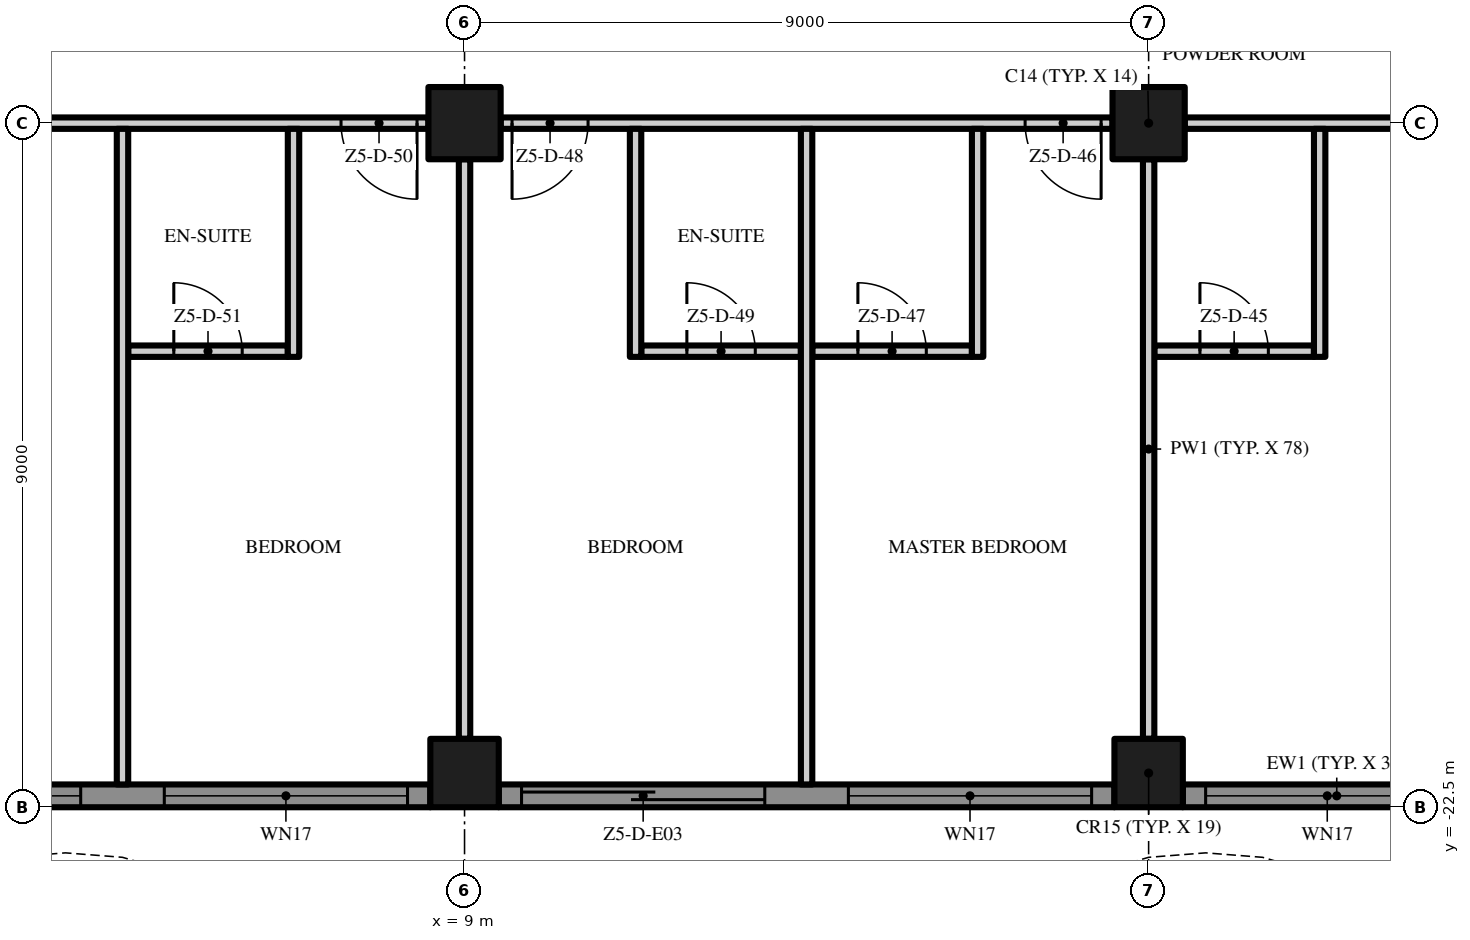
"""IFC4 building model, lengths in metres.
Left out: names, types, materials, properties, quantities, classifications, styles, units other than length and angle.
Written with IfcOpenShell. Run it as: python <this file> out.ifc"""

import sys

from ifc_helpers import new_model, si_unit, direction, frame, frame_2d, origin, origin_2d, place, context, subcontext, project, spatial, polyline, rectangle, outline, extrude, element, fill, save


model = new_model("IFC4")
c1 = context("Model", 3, precision=1e-05, world=origin(), true_north=direction((0.0, 1.0)))
c2 = subcontext(c1, "Body", "Model", "MODEL_VIEW")
j1 = project(units=[si_unit("LENGTHUNIT", "METRE"), si_unit("PLANEANGLEUNIT", "RADIAN")], contexts=[c1])
p1 = place(None, origin())
s1 = spatial("IfcSite", under=j1, at=p1, CompositionType="ELEMENT")
p2 = place(p1, origin())
s2 = spatial("IfcBuilding", under=s1, at=p2, CompositionType="ELEMENT")
p3 = place(p2, frame((0.0, 0.0, 273.0)))
s3 = spatial("IfcBuildingStorey", under=s2, at=p3, CompositionType="ELEMENT", Elevation=273.0)
p4 = place(p3, frame((18.0, -13.5, 0.0), z_axis=(0.0, 0.0, 1.0), x_axis=(1.0, 0.0, 0.0)))
e1 = element("IfcColumn", 1, at=p4, inside=s3, PredefinedType="COLUMN", context=c2, shape_type="SweptSolid", body=[
    extrude(rectangle(XDim=0.95, YDim=0.95, at=origin_2d()), origin(), (0.0, 0.0, 1.0), 3.5),
])
p5 = place(p3, frame((18.0, -22.05, 0.0), z_axis=(0.0, 0.0, 1.0), x_axis=(1.0, 0.0, 0.0)))
e2 = element("IfcColumn", 2, at=p5, inside=s3, PredefinedType="COLUMN", context=c2, shape_type="SweptSolid", body=[
    extrude(rectangle(XDim=0.9, YDim=0.9, at=origin_2d()), origin(), (0.0, 0.0, 1.0), 3.5),
])
p6 = place(p3, frame((9.0, -13.5, 0.0), z_axis=(0.0, 0.0, 1.0), x_axis=(1.0, 0.0, 0.0)))
e3 = element("IfcColumn", 3, at=p6, inside=s3, PredefinedType="COLUMN", context=c2, shape_type="SweptSolid", body=[
    extrude(rectangle(XDim=0.95, YDim=0.95, at=origin_2d()), origin(), (0.0, 0.0, 1.0), 3.5),
])
p7 = place(p3, frame((9.0, -22.05, 0.0), z_axis=(0.0, 0.0, 1.0), x_axis=(1.0, 0.0, 0.0)))
e4 = element("IfcColumn", 4, at=p7, inside=s3, PredefinedType="COLUMN", context=c2, shape_type="SweptSolid", body=[
    extrude(rectangle(XDim=0.9, YDim=0.9, at=origin_2d()), origin(), (0.0, 0.0, 1.0), 3.5),
])
p8 = place(p3, frame((8.55, -22.35, 0.0), z_axis=(0.0, 0.0, 1.0), x_axis=(-1.0, 0.0, 0.0)))
e5 = element("IfcWall", 5, at=p8, inside=s3, PredefinedType="SOLIDWALL", context=c2, shape_type="SweptSolid", body=[
    extrude(rectangle(XDim=8.1, YDim=0.3, at=frame_2d((4.05, 0.0))), origin(), (0.0, 0.0, 1.0), 3.5),
])
p9 = place(p8, frame((4.6, 0.0, 0.45)))
e6 = element("IfcOpeningElement", 6, at=p9, cuts=e5, PredefinedType="OPENING", context=c2, shape_type="SweptSolid", body=[
    extrude(rectangle(XDim=3.2, YDim=2.65, at=frame_2d((1.6, 1.325))), frame((0.0, 0.16, 0.0), z_axis=(0.0, -1.0, 0.0), x_axis=(1.0, 0.0, 0.0)), (0.0, 0.0, 1.0), 0.32),
])
p10 = place(p8, frame((0.3, 0.0, 0.45)))
e7 = element("IfcOpeningElement", 7, at=p10, cuts=e5, PredefinedType="OPENING", context=c2, shape_type="SweptSolid", body=[
    extrude(rectangle(XDim=3.2, YDim=2.65, at=frame_2d((1.6, 1.325))), frame((0.0, 0.16, 0.0), z_axis=(0.0, -1.0, 0.0), x_axis=(1.0, 0.0, 0.0)), (0.0, 0.0, 1.0), 0.32),
])
p11 = place(p3, frame((17.55, -22.35, 0.0), z_axis=(0.0, 0.0, 1.0), x_axis=(-1.0, 0.0, 0.0)))
e8 = element("IfcWall", 8, at=p11, inside=s3, PredefinedType="SOLIDWALL", context=c2, shape_type="SweptSolid", body=[
    extrude(rectangle(XDim=8.1, YDim=0.3, at=frame_2d((4.05, 0.0))), origin(), (0.0, 0.0, 1.0), 3.5),
])
p12 = place(p11, frame((4.6, 0.0, 0.0)))
e9 = element("IfcOpeningElement", 9, at=p12, cuts=e8, PredefinedType="OPENING", context=c2, shape_type="SweptSolid", body=[
    extrude(rectangle(XDim=3.2, YDim=2.4, at=frame_2d((1.6, 1.2))), frame((0.0, 0.16, 0.0), z_axis=(0.0, -1.0, 0.0), x_axis=(1.0, 0.0, 0.0)), (0.0, 0.0, 1.0), 0.32),
])
p13 = place(p11, frame((0.3, 0.0, 0.45)))
e10 = element("IfcOpeningElement", 10, at=p13, cuts=e8, PredefinedType="OPENING", context=c2, shape_type="SweptSolid", body=[
    extrude(rectangle(XDim=3.2, YDim=2.65, at=frame_2d((1.6, 1.325))), frame((0.0, 0.16, 0.0), z_axis=(0.0, -1.0, 0.0), x_axis=(1.0, 0.0, 0.0)), (0.0, 0.0, 1.0), 0.32),
])
p14 = place(p3, frame((22.5, -22.35, 0.0), z_axis=(0.0, 0.0, 1.0), x_axis=(-1.0, 0.0, 0.0)))
e11 = element("IfcWall", 11, at=p14, inside=s3, PredefinedType="SOLIDWALL", context=c2, shape_type="SweptSolid", body=[
    extrude(rectangle(XDim=4.05, YDim=0.3, at=frame_2d((2.025, 0.0))), origin(), (0.0, 0.0, 1.0), 3.5),
])
p15 = place(p14, frame((0.55, 0.0, 0.45)))
e12 = element("IfcOpeningElement", 12, at=p15, cuts=e11, PredefinedType="OPENING", context=c2, shape_type="SweptSolid", body=[
    extrude(rectangle(XDim=3.2, YDim=2.65, at=frame_2d((1.6, 1.325))), frame((0.0, 0.16, 0.0), z_axis=(0.0, -1.0, 0.0), x_axis=(1.0, 0.0, 0.0)), (0.0, 0.0, 1.0), 0.32),
])
p16 = place(p3, origin())
e13 = element("IfcWall", 13, at=p16, inside=s3, PredefinedType="USERDEFINED", context=c2, shape_type="SweptSolid", body=[
    extrude(outline(polyline([(-22.5, -24.3), (-21.0, -25.005), (-19.5, -25.441), (-18.75, -25.5), (-18.0, -25.441), (-16.5, -25.005), (-15.0, -24.3), (-13.5, -23.595), (-12.0, -23.159), (-11.25, -23.1), (-10.5, -23.159), (-9.0, -23.595), (-7.5, -24.3), (-6.0, -25.005), (-4.5, -25.441), (-3.75, -25.5), (-3.0, -25.441), (-1.5, -25.005), (0.0, -24.3), (1.5, -23.595), (3.0, -23.159), (3.75, -23.1), (4.5, -23.159), (6.0, -23.595), (7.5, -24.3), (9.0, -25.005), (10.5, -25.441), (11.25, -25.5), (12.0, -25.441), (13.5, -25.005), (15.0, -24.3), (16.5, -23.595), (18.0, -23.159), (18.75, -23.1), (19.5, -23.159), (21.0, -23.595), (22.5, -24.3), (22.606, -24.074), (21.089, -23.36), (19.545, -22.911), (18.75, -22.849), (17.955, -22.911), (16.411, -23.36), (14.894, -24.074), (13.411, -24.771), (11.955, -25.194), (11.25, -25.249), (10.545, -25.194), (9.089, -24.771), (7.606, -24.074), (6.089, -23.36), (4.545, -22.911), (3.75, -22.849), (2.955, -22.911), (1.411, -23.36), (-0.106, -24.074), (-1.589, -24.771), (-3.045, -25.194), (-3.75, -25.249), (-4.455, -25.194), (-5.911, -24.771), (-7.394, -24.074), (-8.911, -23.36), (-10.455, -22.911), (-11.25, -22.849), (-12.045, -22.911), (-13.589, -23.36), (-15.106, -24.074), (-16.589, -24.771), (-18.045, -25.194), (-18.75, -25.249), (-19.455, -25.194), (-20.911, -24.771), (-22.394, -24.074), (-22.5, -24.3)])), origin(), (0.0, 0.0, 1.0), 0.9),
])
p17 = place(p3, frame((4.575, -16.5, 0.0), z_axis=(0.0, 0.0, 1.0), x_axis=(1.0, 0.0, 0.0)))
e14 = element("IfcWall", 14, at=p17, inside=s3, PredefinedType="PARTITIONING", context=c2, shape_type="SweptSolid", body=[
    extrude(rectangle(XDim=2.1, YDim=0.15, at=frame_2d((1.05, 0.0))), origin(), (0.0, 0.0, 1.0), 3.5),
])
p18 = place(p17, frame((0.6, 0.0, 0.0)))
e15 = element("IfcOpeningElement", 15, at=p18, cuts=e14, PredefinedType="OPENING", context=c2, shape_type="SweptSolid", body=[
    extrude(rectangle(XDim=0.9, YDim=2.1, at=frame_2d((0.45, 1.05))), frame((0.0, 0.085, 0.0), z_axis=(0.0, -1.0, 0.0), x_axis=(1.0, 0.0, 0.0)), (0.0, 0.0, 1.0), 0.17),
])
p19 = place(p3, frame((11.325, -16.5, 0.0), z_axis=(0.0, 0.0, 1.0), x_axis=(1.0, 0.0, 0.0)))
e16 = element("IfcWall", 16, at=p19, inside=s3, PredefinedType="PARTITIONING", context=c2, shape_type="SweptSolid", body=[
    extrude(rectangle(XDim=2.1, YDim=0.15, at=frame_2d((1.05, 0.0))), origin(), (0.0, 0.0, 1.0), 3.5),
])
p20 = place(p19, frame((0.6, 0.0, 0.0)))
e17 = element("IfcOpeningElement", 17, at=p20, cuts=e16, PredefinedType="OPENING", context=c2, shape_type="SweptSolid", body=[
    extrude(rectangle(XDim=0.9, YDim=2.1, at=frame_2d((0.45, 1.05))), frame((0.0, 0.085, 0.0), z_axis=(0.0, -1.0, 0.0), x_axis=(1.0, 0.0, 0.0)), (0.0, 0.0, 1.0), 0.17),
])
p21 = place(p3, frame((13.575, -16.5, 0.0), z_axis=(0.0, 0.0, 1.0), x_axis=(1.0, 0.0, 0.0)))
e18 = element("IfcWall", 18, at=p21, inside=s3, PredefinedType="PARTITIONING", context=c2, shape_type="SweptSolid", body=[
    extrude(rectangle(XDim=2.1, YDim=0.15, at=frame_2d((1.05, 0.0))), origin(), (0.0, 0.0, 1.0), 3.5),
])
p22 = place(p21, frame((0.6, 0.0, 0.0)))
e19 = element("IfcOpeningElement", 19, at=p22, cuts=e18, PredefinedType="OPENING", context=c2, shape_type="SweptSolid", body=[
    extrude(rectangle(XDim=0.9, YDim=2.1, at=frame_2d((0.45, 1.05))), frame((0.0, 0.085, 0.0), z_axis=(0.0, -1.0, 0.0), x_axis=(1.0, 0.0, 0.0)), (0.0, 0.0, 1.0), 0.17),
])
p23 = place(p3, frame((18.075, -16.5, 0.0), z_axis=(0.0, 0.0, 1.0), x_axis=(1.0, 0.0, 0.0)))
e20 = element("IfcWall", 20, at=p23, inside=s3, PredefinedType="PARTITIONING", context=c2, shape_type="SweptSolid", body=[
    extrude(rectangle(XDim=2.1, YDim=0.15, at=frame_2d((1.05, 0.0))), origin(), (0.0, 0.0, 1.0), 3.5),
])
p24 = place(p23, frame((0.6, 0.0, 0.0)))
e21 = element("IfcOpeningElement", 21, at=p24, cuts=e20, PredefinedType="OPENING", context=c2, shape_type="SweptSolid", body=[
    extrude(rectangle(XDim=0.9, YDim=2.1, at=frame_2d((0.45, 1.05))), frame((0.0, 0.085, 0.0), z_axis=(0.0, -1.0, 0.0), x_axis=(1.0, 0.0, 0.0)), (0.0, 0.0, 1.0), 0.17),
])
p25 = place(p3, frame((8.525, -13.5, 0.0), z_axis=(0.0, 0.0, 1.0), x_axis=(-1.0, 0.0, 0.0)))
e22 = element("IfcWall", 22, at=p25, inside=s3, PredefinedType="PARTITIONING", context=c2, shape_type="SweptSolid", body=[
    extrude(rectangle(XDim=8.05, YDim=0.15, at=frame_2d((4.025, 0.0))), origin(), (0.0, 0.0, 1.0), 3.5),
])
p26 = place(p25, frame((0.15, 0.0, 0.0)))
e23 = element("IfcOpeningElement", 23, at=p26, cuts=e22, PredefinedType="OPENING", context=c2, shape_type="SweptSolid", body=[
    extrude(rectangle(XDim=1.0, YDim=2.4, at=frame_2d((0.5, 1.2))), frame((0.0, 0.085, 0.0), z_axis=(0.0, -1.0, 0.0), x_axis=(1.0, 0.0, 0.0)), (0.0, 0.0, 1.0), 0.17),
])
p27 = place(p25, frame((5.8, 0.0, 0.0)))
e24 = element("IfcOpeningElement", 24, at=p27, cuts=e22, PredefinedType="OPENING", context=c2, shape_type="SweptSolid", body=[
    extrude(rectangle(XDim=1.0, YDim=2.4, at=frame_2d((0.5, 1.2))), frame((0.0, 0.085, 0.0), z_axis=(0.0, -1.0, 0.0), x_axis=(1.0, 0.0, 0.0)), (0.0, 0.0, 1.0), 0.17),
])
p28 = place(p3, frame((17.525, -13.5, 0.0), z_axis=(0.0, 0.0, 1.0), x_axis=(-1.0, 0.0, 0.0)))
e25 = element("IfcWall", 25, at=p28, inside=s3, PredefinedType="PARTITIONING", context=c2, shape_type="SweptSolid", body=[
    extrude(rectangle(XDim=8.05, YDim=0.15, at=frame_2d((4.025, 0.0))), origin(), (0.0, 0.0, 1.0), 3.5),
])
p29 = place(p28, frame((0.15, 0.0, 0.0)))
e26 = element("IfcOpeningElement", 26, at=p29, cuts=e25, PredefinedType="OPENING", context=c2, shape_type="SweptSolid", body=[
    extrude(rectangle(XDim=1.0, YDim=2.4, at=frame_2d((0.5, 1.2))), frame((0.0, 0.085, 0.0), z_axis=(0.0, -1.0, 0.0), x_axis=(1.0, 0.0, 0.0)), (0.0, 0.0, 1.0), 0.17),
])
p30 = place(p28, frame((6.9, 0.0, 0.0)))
e27 = element("IfcOpeningElement", 27, at=p30, cuts=e25, PredefinedType="OPENING", context=c2, shape_type="SweptSolid", body=[
    extrude(rectangle(XDim=1.0, YDim=2.4, at=frame_2d((0.5, 1.2))), frame((0.0, 0.085, 0.0), z_axis=(0.0, -1.0, 0.0), x_axis=(1.0, 0.0, 0.0)), (0.0, 0.0, 1.0), 0.17),
])
p31 = place(p3, frame((26.1, -13.5, 0.0), z_axis=(0.0, 0.0, 1.0), x_axis=(-1.0, 0.0, 0.0)))
e28 = element("IfcWall", 28, at=p31, inside=s3, PredefinedType="PARTITIONING", context=c2, shape_type="SweptSolid", body=[
    extrude(rectangle(XDim=7.625, YDim=0.15, at=frame_2d((3.812, 0.0))), origin(), (0.0, 0.0, 1.0), 3.5),
])
p32 = place(p31, frame((1.6, 0.0, 0.0)))
e29 = element("IfcOpeningElement", 29, at=p32, cuts=e28, PredefinedType="OPENING", context=c2, shape_type="SweptSolid", body=[
    extrude(rectangle(XDim=1.8, YDim=2.4, at=frame_2d((0.9, 1.2))), frame((0.0, 0.085, 0.0), z_axis=(0.0, -1.0, 0.0), x_axis=(1.0, 0.0, 0.0)), (0.0, 0.0, 1.0), 0.17),
])
p33 = place(p3, frame((4.5, -22.2, 0.0), z_axis=(0.0, 0.0, 1.0), x_axis=(0.0, 1.0, 0.0)))
e30 = element("IfcWall", 30, at=p33, inside=s3, PredefinedType="PARTITIONING", context=c2, shape_type="SweptSolid", body=[
    extrude(rectangle(XDim=8.625, YDim=0.15, at=frame_2d((4.312, 0.0))), origin(), (0.0, 0.0, 1.0), 3.5),
])
p34 = place(p3, frame((6.75, -16.575, 0.0), z_axis=(0.0, 0.0, 1.0), x_axis=(0.0, 1.0, 0.0)))
e31 = element("IfcWall", 31, at=p34, inside=s3, PredefinedType="PARTITIONING", context=c2, shape_type="SweptSolid", body=[
    extrude(rectangle(XDim=3.0, YDim=0.15, at=frame_2d((1.5, 0.0))), origin(), (0.0, 0.0, 1.0), 3.5),
])
p35 = place(p3, frame((9.0, -21.6, 0.0), z_axis=(0.0, 0.0, 1.0), x_axis=(0.0, 1.0, 0.0)))
e32 = element("IfcWall", 32, at=p35, inside=s3, PredefinedType="PARTITIONING", context=c2, shape_type="SweptSolid", body=[
    extrude(rectangle(XDim=7.625, YDim=0.15, at=frame_2d((3.812, 0.0))), origin(), (0.0, 0.0, 1.0), 3.5),
])
p36 = place(p3, frame((11.25, -16.575, 0.0), z_axis=(0.0, 0.0, 1.0), x_axis=(0.0, 1.0, 0.0)))
e33 = element("IfcWall", 33, at=p36, inside=s3, PredefinedType="PARTITIONING", context=c2, shape_type="SweptSolid", body=[
    extrude(rectangle(XDim=3.0, YDim=0.15, at=frame_2d((1.5, 0.0))), origin(), (0.0, 0.0, 1.0), 3.5),
])
p37 = place(p3, frame((13.5, -22.2, 0.0), z_axis=(0.0, 0.0, 1.0), x_axis=(0.0, 1.0, 0.0)))
e34 = element("IfcWall", 34, at=p37, inside=s3, PredefinedType="PARTITIONING", context=c2, shape_type="SweptSolid", body=[
    extrude(rectangle(XDim=8.625, YDim=0.15, at=frame_2d((4.312, 0.0))), origin(), (0.0, 0.0, 1.0), 3.5),
])
p38 = place(p3, frame((15.75, -16.575, 0.0), z_axis=(0.0, 0.0, 1.0), x_axis=(0.0, 1.0, 0.0)))
e35 = element("IfcWall", 35, at=p38, inside=s3, PredefinedType="PARTITIONING", context=c2, shape_type="SweptSolid", body=[
    extrude(rectangle(XDim=3.0, YDim=0.15, at=frame_2d((1.5, 0.0))), origin(), (0.0, 0.0, 1.0), 3.5),
])
p39 = place(p3, frame((18.0, -21.6, 0.0), z_axis=(0.0, 0.0, 1.0), x_axis=(0.0, 1.0, 0.0)))
e36 = element("IfcWall", 36, at=p39, inside=s3, PredefinedType="PARTITIONING", context=c2, shape_type="SweptSolid", body=[
    extrude(rectangle(XDim=7.625, YDim=0.15, at=frame_2d((3.812, 0.0))), origin(), (0.0, 0.0, 1.0), 3.5),
])
p40 = place(p3, frame((20.25, -16.575, 0.0), z_axis=(0.0, 0.0, 1.0), x_axis=(0.0, 1.0, 0.0)))
e37 = element("IfcWall", 37, at=p40, inside=s3, PredefinedType="PARTITIONING", context=c2, shape_type="SweptSolid", body=[
    extrude(rectangle(XDim=3.0, YDim=0.15, at=frame_2d((1.5, 0.0))), origin(), (0.0, 0.0, 1.0), 3.5),
])
p41 = place(p9, origin())
e38 = element("IfcWindow", 38, at=p41, inside=s3, PartitioningType="SINGLE_PANEL", PredefinedType="WINDOW", context=c2, shape_type="SweptSolid", body=[
    extrude(rectangle(XDim=3.2, YDim=2.65, at=frame_2d((1.6, 1.325))), frame((0.0, 0.03, 0.0), z_axis=(0.0, -1.0, 0.0), x_axis=(1.0, 0.0, 0.0)), (0.0, 0.0, 1.0), 0.06),
])
fill(e6, e38)
p42 = place(p10, origin())
e39 = element("IfcWindow", 39, at=p42, inside=s3, PartitioningType="SINGLE_PANEL", PredefinedType="WINDOW", context=c2, shape_type="SweptSolid", body=[
    extrude(rectangle(XDim=3.2, YDim=2.65, at=frame_2d((1.6, 1.325))), frame((0.0, 0.03, 0.0), z_axis=(0.0, -1.0, 0.0), x_axis=(1.0, 0.0, 0.0)), (0.0, 0.0, 1.0), 0.06),
])
fill(e7, e39)
p43 = place(p12, origin())
e40 = element("IfcDoor", 40, at=p43, inside=s3, OperationType="SINGLE_SWING_LEFT", PredefinedType="DOOR", context=c2, shape_type="SweptSolid", body=[
    extrude(rectangle(XDim=3.2, YDim=2.4, at=frame_2d((1.6, 1.2))), frame((0.0, 0.025, 0.0), z_axis=(0.0, -1.0, 0.0), x_axis=(1.0, 0.0, 0.0)), (0.0, 0.0, 1.0), 0.05),
])
fill(e9, e40)
p44 = place(p13, origin())
e41 = element("IfcWindow", 41, at=p44, inside=s3, PartitioningType="SINGLE_PANEL", PredefinedType="WINDOW", context=c2, shape_type="SweptSolid", body=[
    extrude(rectangle(XDim=3.2, YDim=2.65, at=frame_2d((1.6, 1.325))), frame((0.0, 0.03, 0.0), z_axis=(0.0, -1.0, 0.0), x_axis=(1.0, 0.0, 0.0)), (0.0, 0.0, 1.0), 0.06),
])
fill(e10, e41)
p45 = place(p15, origin())
e42 = element("IfcWindow", 42, at=p45, inside=s3, PartitioningType="SINGLE_PANEL", PredefinedType="WINDOW", context=c2, shape_type="SweptSolid", body=[
    extrude(rectangle(XDim=3.2, YDim=2.65, at=frame_2d((1.6, 1.325))), frame((0.0, 0.03, 0.0), z_axis=(0.0, -1.0, 0.0), x_axis=(1.0, 0.0, 0.0)), (0.0, 0.0, 1.0), 0.06),
])
fill(e12, e42)
p46 = place(p24, origin())
e43 = element("IfcDoor", 43, at=p46, inside=s3, OperationType="SINGLE_SWING_LEFT", PredefinedType="DOOR", context=c2, shape_type="SweptSolid", body=[
    extrude(rectangle(XDim=0.9, YDim=2.1, at=frame_2d((0.45, 1.05))), frame((0.0, 0.025, 0.0), z_axis=(0.0, -1.0, 0.0), x_axis=(1.0, 0.0, 0.0)), (0.0, 0.0, 1.0), 0.05),
])
fill(e21, e43)
p47 = place(p29, origin())
e44 = element("IfcDoor", 44, at=p47, inside=s3, OperationType="SINGLE_SWING_LEFT", PredefinedType="DOOR", context=c2, shape_type="SweptSolid", body=[
    extrude(rectangle(XDim=1.0, YDim=2.4, at=frame_2d((0.5, 1.2))), frame((0.0, 0.025, 0.0), z_axis=(0.0, -1.0, 0.0), x_axis=(1.0, 0.0, 0.0)), (0.0, 0.0, 1.0), 0.05),
])
fill(e26, e44)
p48 = place(p22, origin())
e45 = element("IfcDoor", 45, at=p48, inside=s3, OperationType="SINGLE_SWING_LEFT", PredefinedType="DOOR", context=c2, shape_type="SweptSolid", body=[
    extrude(rectangle(XDim=0.9, YDim=2.1, at=frame_2d((0.45, 1.05))), frame((0.0, 0.025, 0.0), z_axis=(0.0, -1.0, 0.0), x_axis=(1.0, 0.0, 0.0)), (0.0, 0.0, 1.0), 0.05),
])
fill(e19, e45)
p49 = place(p30, origin())
e46 = element("IfcDoor", 46, at=p49, inside=s3, OperationType="SINGLE_SWING_RIGHT", PredefinedType="DOOR", context=c2, shape_type="SweptSolid", body=[
    extrude(rectangle(XDim=1.0, YDim=2.4, at=frame_2d((0.5, 1.2))), frame((0.0, 0.025, 0.0), z_axis=(0.0, -1.0, 0.0), x_axis=(1.0, 0.0, 0.0)), (0.0, 0.0, 1.0), 0.05),
])
fill(e27, e46)
p50 = place(p20, origin())
e47 = element("IfcDoor", 47, at=p50, inside=s3, OperationType="SINGLE_SWING_LEFT", PredefinedType="DOOR", context=c2, shape_type="SweptSolid", body=[
    extrude(rectangle(XDim=0.9, YDim=2.1, at=frame_2d((0.45, 1.05))), frame((0.0, 0.025, 0.0), z_axis=(0.0, -1.0, 0.0), x_axis=(1.0, 0.0, 0.0)), (0.0, 0.0, 1.0), 0.05),
])
fill(e17, e47)
p51 = place(p26, origin())
e48 = element("IfcDoor", 48, at=p51, inside=s3, OperationType="SINGLE_SWING_LEFT", PredefinedType="DOOR", context=c2, shape_type="SweptSolid", body=[
    extrude(rectangle(XDim=1.0, YDim=2.4, at=frame_2d((0.5, 1.2))), frame((0.0, 0.025, 0.0), z_axis=(0.0, -1.0, 0.0), x_axis=(1.0, 0.0, 0.0)), (0.0, 0.0, 1.0), 0.05),
])
fill(e23, e48)
p52 = place(p18, origin())
e49 = element("IfcDoor", 49, at=p52, inside=s3, OperationType="SINGLE_SWING_LEFT", PredefinedType="DOOR", context=c2, shape_type="SweptSolid", body=[
    extrude(rectangle(XDim=0.9, YDim=2.1, at=frame_2d((0.45, 1.05))), frame((0.0, 0.025, 0.0), z_axis=(0.0, -1.0, 0.0), x_axis=(1.0, 0.0, 0.0)), (0.0, 0.0, 1.0), 0.05),
])
fill(e15, e49)
save(model, sys.argv[1])
